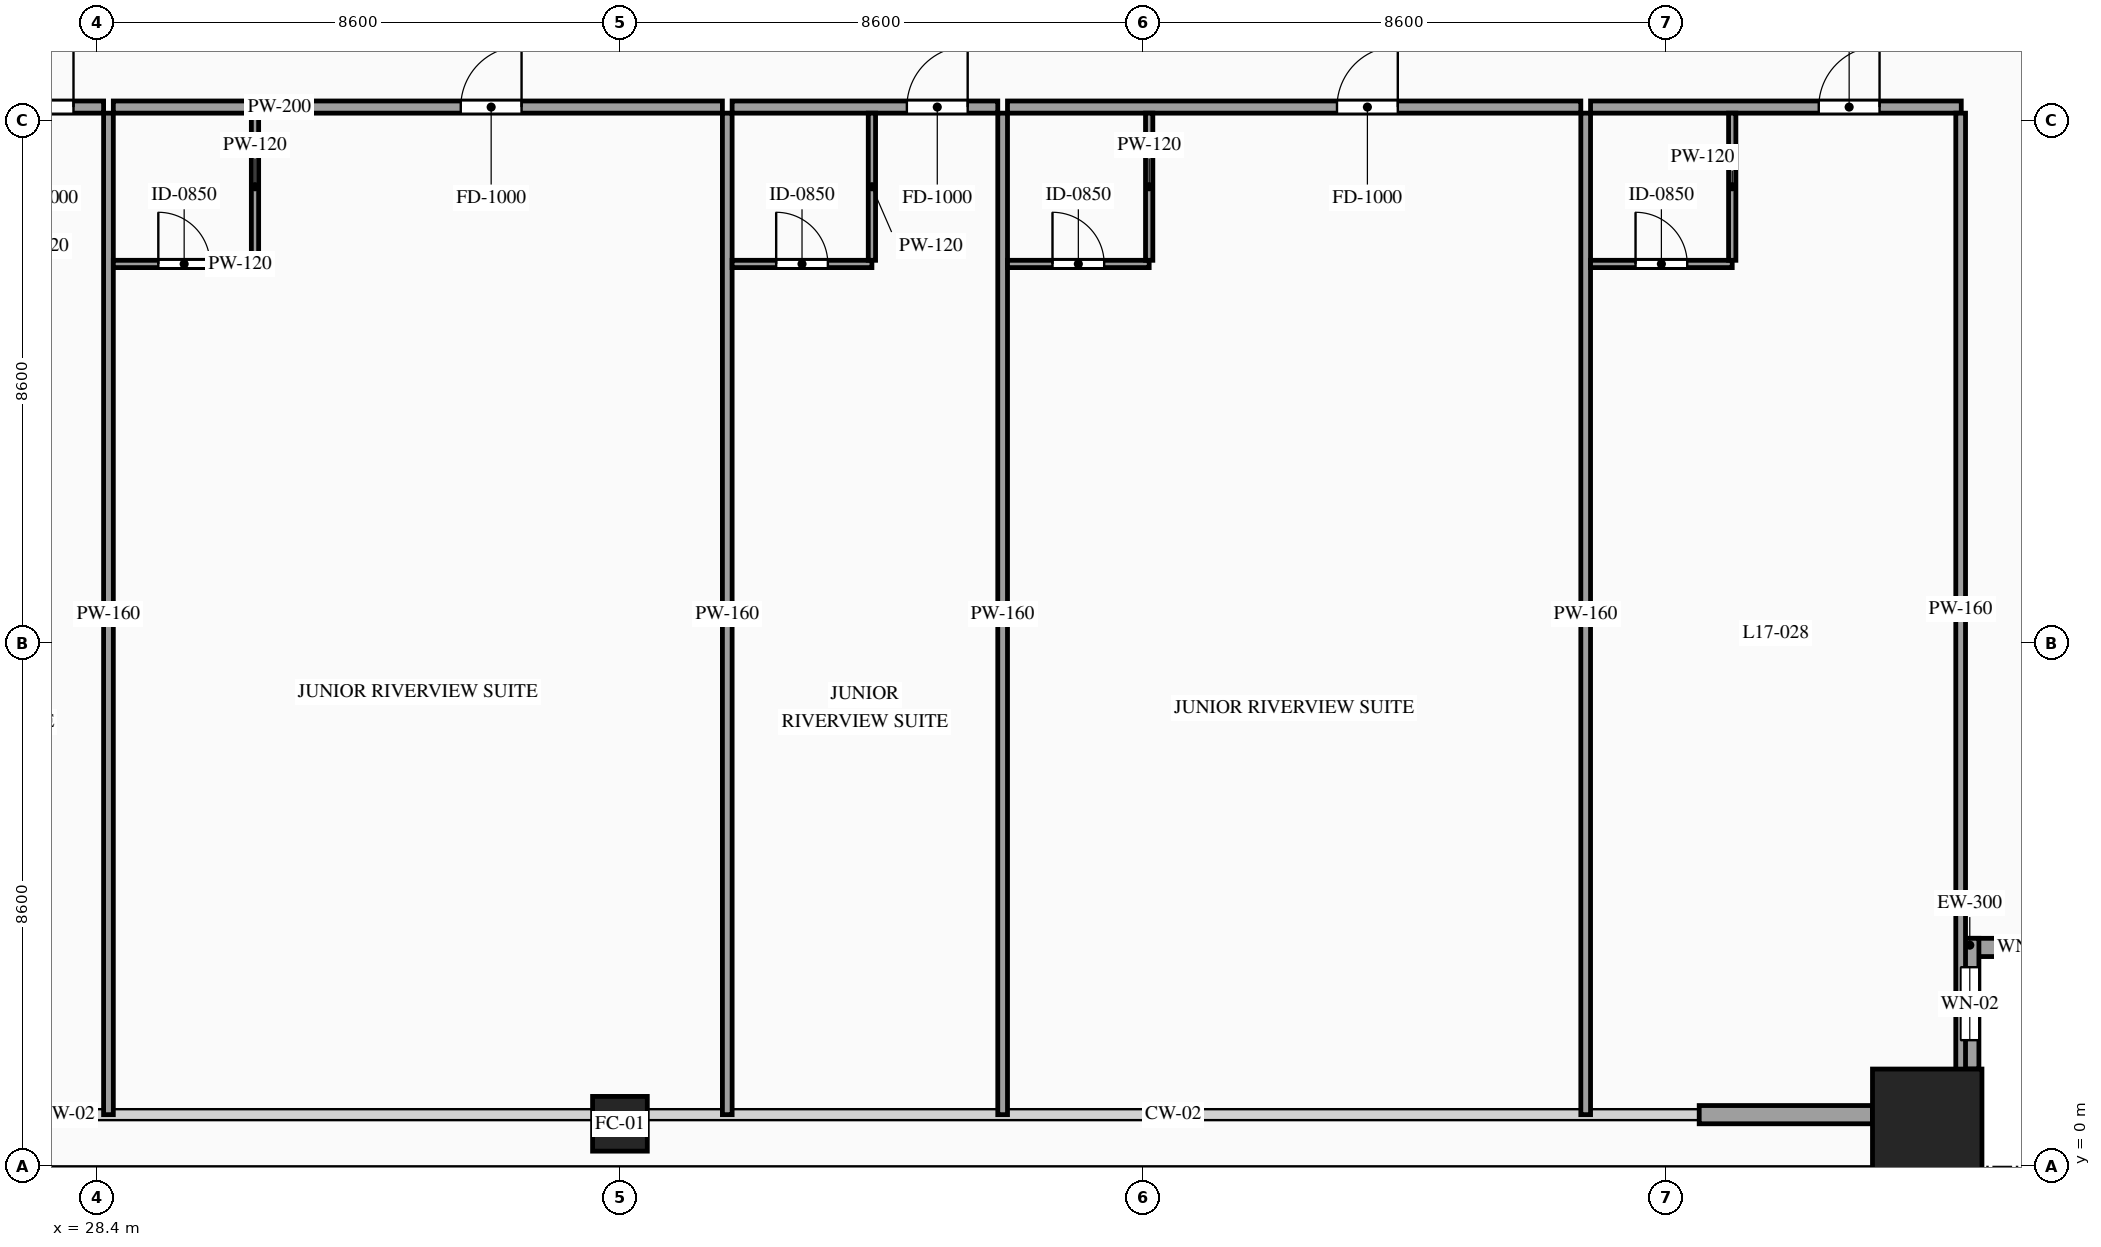
"""IFC4 building model, lengths in metres.
Left out: names, types, materials, properties, quantities, classifications, styles, units other than length and angle.
Written with IfcOpenShell. Run it as: python <this file> out.ifc"""

import sys

from ifc_helpers import new_model, si_unit, direction, frame, frame_2d, origin, origin_2d, place, context, subcontext, project, spatial, rectangle, hollow_rectangle, extrude, source, transform, mapped, element, fill, save


model = new_model("IFC4")
c1 = context("Model", 3, precision=1e-05, world=origin(), true_north=direction((0.0, 1.0)))
c2 = subcontext(c1, "Body", "Model", "MODEL_VIEW")
j1 = project(units=[si_unit("LENGTHUNIT", "METRE"), si_unit("PLANEANGLEUNIT", "RADIAN")], contexts=[c1])
p1 = place(None, origin())
s1 = spatial("IfcSite", under=j1, at=p1, CompositionType="ELEMENT")
p2 = place(p1, origin())
s2 = spatial("IfcBuilding", under=s1, at=p2, CompositionType="ELEMENT")
p3 = place(p2, frame((0.0, 0.0, 67.6)))
s3 = spatial("IfcBuildingStorey", under=s2, at=p3, CompositionType="ELEMENT", Elevation=67.6)
m1 = source(origin(), c2, "Body", "SweptSolid", [
    extrude(hollow_rectangle(XDim=0.9, YDim=0.9, WallThickness=0.042, at=origin_2d()), origin(), (0.0, 0.0, 1.0), 3.6),
])
p4 = place(p3, frame((37.0, 0.7, 0.0), z_axis=(0.0, 0.0, 1.0), x_axis=(1.0, 0.0, 0.0)))
e1 = element("IfcColumn", 1, at=p4, inside=s3, PredefinedType="COLUMN", context=c2, shape_type="MappedRepresentation", body=[
    mapped(m1, transform((0.0, 0.0, 0.0), scale=1.0)),
])
m2 = source(origin(), c2, "Body", "SweptSolid", [
    extrude(hollow_rectangle(XDim=1.8, YDim=1.8, WallThickness=0.08, at=origin_2d()), origin(), (0.0, 0.0, 1.0), 3.6),
])
p5 = place(p3, frame((58.5, 0.7, 0.0), z_axis=(0.0, 0.0, 1.0), x_axis=(1.0, 0.0, 0.0)))
e2 = element("IfcColumn", 2, at=p5, inside=s3, PredefinedType="COLUMN", context=c2, shape_type="MappedRepresentation", body=[
    mapped(m2, transform((0.0, 0.0, 0.0), scale=1.0)),
])
p6 = place(p3, frame((59.05, 3.6, 0.0), z_axis=(0.0, 0.0, 1.0), x_axis=(1.0, 0.0, 0.0)))
e3 = element("IfcWall", 3, at=p6, inside=s3, PredefinedType="SOLIDWALL", context=c2, shape_type="SweptSolid", body=[
    extrude(rectangle(XDim=2.15, YDim=0.3, at=frame_2d((1.075, 0.0))), origin(), (0.0, 0.0, 1.0), 3.38),
])
p7 = place(p6, frame((0.625, 0.0, 0.85)))
e4 = element("IfcOpeningElement", 4, at=p7, cuts=e3, PredefinedType="OPENING", context=c2, shape_type="SweptSolid", body=[
    extrude(rectangle(XDim=0.9, YDim=1.5, at=frame_2d((0.45, 0.75))), frame((0.0, 0.165, 0.0), z_axis=(0.0, -1.0, 0.0), x_axis=(1.0, 0.0, 0.0)), (0.0, 0.0, 1.0), 0.33),
])
p8 = place(p3, frame((59.2, 1.6, 0.0), z_axis=(0.0, 0.0, 1.0), x_axis=(0.0, 1.0, 0.0)))
e5 = element("IfcWall", 5, at=p8, inside=s3, PredefinedType="SOLIDWALL", context=c2, shape_type="SweptSolid", body=[
    extrude(rectangle(XDim=2.15, YDim=0.3, at=frame_2d((1.075, 0.0))), origin(), (0.0, 0.0, 1.0), 3.38),
])
p9 = place(p8, frame((0.475, 0.0, 0.85)))
e6 = element("IfcOpeningElement", 6, at=p9, cuts=e5, PredefinedType="OPENING", context=c2, shape_type="SweptSolid", body=[
    extrude(rectangle(XDim=1.2, YDim=2.1, at=frame_2d((0.6, 1.05))), frame((0.0, 0.165, 0.0), z_axis=(0.0, -1.0, 0.0), x_axis=(1.0, 0.0, 0.0)), (0.0, 0.0, 1.0), 0.33),
])
m3 = source(origin(), c2, "Body", "SweptSolid", [
    extrude(rectangle(XDim=2.85, YDim=0.3, at=frame_2d((1.425, 0.0))), origin(), (0.0, 0.0, 1.0), 2.775),
])
p10 = place(p3, frame((54.75, 0.85, 0.0), z_axis=(0.0, 0.0, 1.0), x_axis=(1.0, 0.0, 0.0)))
e7 = element("IfcWall", 7, at=p10, inside=s3, PredefinedType="SOLIDWALL", context=c2, shape_type="MappedRepresentation", body=[
    mapped(m3, transform((0.0, 0.0, 0.0), scale=1.0)),
])
p11 = place(p3, frame((24.138, 17.42, 0.0), z_axis=(0.0, 0.0, 1.0), x_axis=(1.0, 0.0, 0.0)))
e8 = element("IfcWall", 8, at=p11, inside=s3, PredefinedType="PARTITIONING", context=c2, shape_type="SweptSolid", body=[
    extrude(rectangle(XDim=4.37, YDim=0.2, at=frame_2d((2.185, 0.0))), origin(), (0.0, 0.0, 1.0), 3.38),
])
p12 = place(p11, frame((2.875, 0.0, 0.0)))
e9 = element("IfcOpeningElement", 9, at=p12, cuts=e8, PredefinedType="OPENING", context=c2, shape_type="SweptSolid", body=[
    extrude(rectangle(XDim=1.0, YDim=2.2, at=frame_2d((0.5, 1.1))), frame((0.0, 0.115, 0.0), z_axis=(0.0, -1.0, 0.0), x_axis=(1.0, 0.0, 0.0)), (0.0, 0.0, 1.0), 0.23),
])
m4 = source(origin(), c2, "Body", "SweptSolid", [
    extrude(rectangle(XDim=16.47, YDim=0.16, at=frame_2d((8.235, 0.0))), origin(), (0.0, 0.0, 1.0), 3.38),
])
p13 = place(p3, frame((28.588, 0.85, 0.0), z_axis=(0.0, 0.0, 1.0), x_axis=(0.0, 1.0, 0.0)))
e10 = element("IfcWall", 10, at=p13, inside=s3, PredefinedType="PARTITIONING", context=c2, shape_type="MappedRepresentation", body=[
    mapped(m4, transform((0.0, 0.0, 0.0), scale=1.0)),
])
p14 = place(p3, frame((28.668, 17.42, 0.0), z_axis=(0.0, 0.0, 1.0), x_axis=(1.0, 0.0, 0.0)))
e11 = element("IfcWall", 11, at=p14, inside=s3, PredefinedType="PARTITIONING", context=c2, shape_type="SweptSolid", body=[
    extrude(rectangle(XDim=10.017, YDim=0.2, at=frame_2d((5.009, 0.0))), origin(), (0.0, 0.0, 1.0), 3.38),
])
p15 = place(p14, frame((5.714, 0.0, 0.0)))
e12 = element("IfcOpeningElement", 12, at=p15, cuts=e11, PredefinedType="OPENING", context=c2, shape_type="SweptSolid", body=[
    extrude(rectangle(XDim=1.0, YDim=2.2, at=frame_2d((0.5, 1.1))), frame((0.0, 0.115, 0.0), z_axis=(0.0, -1.0, 0.0), x_axis=(1.0, 0.0, 0.0)), (0.0, 0.0, 1.0), 0.23),
])
p16 = place(p3, frame((38.765, 0.85, 0.0), z_axis=(0.0, 0.0, 1.0), x_axis=(0.0, 1.0, 0.0)))
e13 = element("IfcWall", 13, at=p16, inside=s3, PredefinedType="PARTITIONING", context=c2, shape_type="MappedRepresentation", body=[
    mapped(m4, transform((0.0, 0.0, 0.0), scale=1.0)),
])
p17 = place(p3, frame((28.668, 14.84, 0.0), z_axis=(0.0, 0.0, 1.0), x_axis=(1.0, 0.0, 0.0)))
e14 = element("IfcWall", 14, at=p17, inside=s3, PredefinedType="PARTITIONING", context=c2, shape_type="SweptSolid", body=[
    extrude(rectangle(XDim=2.33, YDim=0.12, at=frame_2d((1.165, 0.0))), origin(), (0.0, 0.0, 1.0), 3.38),
])
p18 = place(p17, frame((0.74, 0.0, 0.0)))
e15 = element("IfcOpeningElement", 15, at=p18, cuts=e14, PredefinedType="OPENING", context=c2, shape_type="SweptSolid", body=[
    extrude(rectangle(XDim=0.85, YDim=2.1, at=frame_2d((0.425, 1.05))), frame((0.0, 0.075, 0.0), z_axis=(0.0, -1.0, 0.0), x_axis=(1.0, 0.0, 0.0)), (0.0, 0.0, 1.0), 0.15),
])
m5 = source(origin(), c2, "Body", "SweptSolid", [
    extrude(rectangle(XDim=2.42, YDim=0.12, at=frame_2d((1.21, 0.0))), origin(), (0.0, 0.0, 1.0), 3.38),
])
p19 = place(p3, frame((30.998, 14.9, 0.0), z_axis=(0.0, 0.0, 1.0), x_axis=(0.0, 1.0, 0.0)))
e16 = element("IfcWall", 16, at=p19, inside=s3, PredefinedType="PARTITIONING", context=c2, shape_type="MappedRepresentation", body=[
    mapped(m5, transform((0.0, 0.0, 0.0), scale=1.0)),
])
p20 = place(p3, frame((38.845, 17.42, 0.0), z_axis=(0.0, 0.0, 1.0), x_axis=(1.0, 0.0, 0.0)))
e17 = element("IfcWall", 17, at=p20, inside=s3, PredefinedType="PARTITIONING", context=c2, shape_type="SweptSolid", body=[
    extrude(rectangle(XDim=4.369, YDim=0.2, at=frame_2d((2.185, 0.0))), origin(), (0.0, 0.0, 1.0), 3.38),
])
p21 = place(p20, frame((2.874, 0.0, 0.0)))
e18 = element("IfcOpeningElement", 18, at=p21, cuts=e17, PredefinedType="OPENING", context=c2, shape_type="SweptSolid", body=[
    extrude(rectangle(XDim=1.0, YDim=2.2, at=frame_2d((0.5, 1.1))), frame((0.0, 0.115, 0.0), z_axis=(0.0, -1.0, 0.0), x_axis=(1.0, 0.0, 0.0)), (0.0, 0.0, 1.0), 0.23),
])
p22 = place(p3, frame((43.294, 0.85, 0.0), z_axis=(0.0, 0.0, 1.0), x_axis=(0.0, 1.0, 0.0)))
e19 = element("IfcWall", 19, at=p22, inside=s3, PredefinedType="PARTITIONING", context=c2, shape_type="MappedRepresentation", body=[
    mapped(m4, transform((0.0, 0.0, 0.0), scale=1.0)),
])
p23 = place(p3, frame((38.845, 14.84, 0.0), z_axis=(0.0, 0.0, 1.0), x_axis=(1.0, 0.0, 0.0)))
e20 = element("IfcWall", 20, at=p23, inside=s3, PredefinedType="PARTITIONING", context=c2, shape_type="SweptSolid", body=[
    extrude(rectangle(XDim=2.299, YDim=0.12, at=frame_2d((1.149, 0.0))), origin(), (0.0, 0.0, 1.0), 3.38),
])
p24 = place(p23, frame((0.725, 0.0, 0.0)))
e21 = element("IfcOpeningElement", 21, at=p24, cuts=e20, PredefinedType="OPENING", context=c2, shape_type="SweptSolid", body=[
    extrude(rectangle(XDim=0.85, YDim=2.1, at=frame_2d((0.425, 1.05))), frame((0.0, 0.075, 0.0), z_axis=(0.0, -1.0, 0.0), x_axis=(1.0, 0.0, 0.0)), (0.0, 0.0, 1.0), 0.15),
])
p25 = place(p3, frame((41.144, 14.9, 0.0), z_axis=(0.0, 0.0, 1.0), x_axis=(0.0, 1.0, 0.0)))
e22 = element("IfcWall", 22, at=p25, inside=s3, PredefinedType="PARTITIONING", context=c2, shape_type="MappedRepresentation", body=[
    mapped(m5, transform((0.0, 0.0, 0.0), scale=1.0)),
])
p26 = place(p3, frame((43.374, 17.42, 0.0), z_axis=(0.0, 0.0, 1.0), x_axis=(1.0, 0.0, 0.0)))
e23 = element("IfcWall", 23, at=p26, inside=s3, PredefinedType="PARTITIONING", context=c2, shape_type="SweptSolid", body=[
    extrude(rectangle(XDim=9.429, YDim=0.2, at=frame_2d((4.714, 0.0))), origin(), (0.0, 0.0, 1.0), 3.38),
])
p27 = place(p26, frame((5.419, 0.0, 0.0)))
e24 = element("IfcOpeningElement", 24, at=p27, cuts=e23, PredefinedType="OPENING", context=c2, shape_type="SweptSolid", body=[
    extrude(rectangle(XDim=1.0, YDim=2.2, at=frame_2d((0.5, 1.1))), frame((0.0, 0.115, 0.0), z_axis=(0.0, -1.0, 0.0), x_axis=(1.0, 0.0, 0.0)), (0.0, 0.0, 1.0), 0.23),
])
p28 = place(p3, frame((52.883, 0.85, 0.0), z_axis=(0.0, 0.0, 1.0), x_axis=(0.0, 1.0, 0.0)))
e25 = element("IfcWall", 25, at=p28, inside=s3, PredefinedType="PARTITIONING", context=c2, shape_type="MappedRepresentation", body=[
    mapped(m4, transform((0.0, 0.0, 0.0), scale=1.0)),
])
p29 = place(p3, frame((43.374, 14.84, 0.0), z_axis=(0.0, 0.0, 1.0), x_axis=(1.0, 0.0, 0.0)))
e26 = element("IfcWall", 26, at=p29, inside=s3, PredefinedType="PARTITIONING", context=c2, shape_type="SweptSolid", body=[
    extrude(rectangle(XDim=2.33, YDim=0.12, at=frame_2d((1.165, 0.0))), origin(), (0.0, 0.0, 1.0), 3.38),
])
p30 = place(p29, frame((0.74, 0.0, 0.0)))
e27 = element("IfcOpeningElement", 27, at=p30, cuts=e26, PredefinedType="OPENING", context=c2, shape_type="SweptSolid", body=[
    extrude(rectangle(XDim=0.85, YDim=2.1, at=frame_2d((0.425, 1.05))), frame((0.0, 0.075, 0.0), z_axis=(0.0, -1.0, 0.0), x_axis=(1.0, 0.0, 0.0)), (0.0, 0.0, 1.0), 0.15),
])
p31 = place(p3, frame((45.704, 14.9, 0.0), z_axis=(0.0, 0.0, 1.0), x_axis=(0.0, 1.0, 0.0)))
e28 = element("IfcWall", 28, at=p31, inside=s3, PredefinedType="PARTITIONING", context=c2, shape_type="MappedRepresentation", body=[
    mapped(m5, transform((0.0, 0.0, 0.0), scale=1.0)),
])
p32 = place(p3, frame((52.963, 17.42, 0.0), z_axis=(0.0, 0.0, 1.0), x_axis=(1.0, 0.0, 0.0)))
e29 = element("IfcWall", 29, at=p32, inside=s3, PredefinedType="PARTITIONING", context=c2, shape_type="SweptSolid", body=[
    extrude(rectangle(XDim=6.097, YDim=0.2, at=frame_2d((3.049, 0.0))), origin(), (0.0, 0.0, 1.0), 3.38),
])
p33 = place(p32, frame((3.753, 0.0, 0.0)))
e30 = element("IfcOpeningElement", 30, at=p33, cuts=e29, PredefinedType="OPENING", context=c2, shape_type="SweptSolid", body=[
    extrude(rectangle(XDim=1.0, YDim=2.2, at=frame_2d((0.5, 1.1))), frame((0.0, 0.115, 0.0), z_axis=(0.0, -1.0, 0.0), x_axis=(1.0, 0.0, 0.0)), (0.0, 0.0, 1.0), 0.23),
])
m6 = source(origin(), c2, "Body", "SweptSolid", [
    extrude(rectangle(XDim=16.32, YDim=0.16, at=frame_2d((8.16, 0.0))), origin(), (0.0, 0.0, 1.0), 3.38),
])
p34 = place(p3, frame((59.05, 1.0, 0.0), z_axis=(0.0, 0.0, 1.0), x_axis=(0.0, 1.0, 0.0)))
e31 = element("IfcWall", 31, at=p34, inside=s3, PredefinedType="PARTITIONING", context=c2, shape_type="MappedRepresentation", body=[
    mapped(m6, transform((0.0, 0.0, 0.0), scale=1.0)),
])
p35 = place(p3, frame((52.963, 14.84, 0.0), z_axis=(0.0, 0.0, 1.0), x_axis=(1.0, 0.0, 0.0)))
e32 = element("IfcWall", 32, at=p35, inside=s3, PredefinedType="PARTITIONING", context=c2, shape_type="SweptSolid", body=[
    extrude(rectangle(XDim=2.33, YDim=0.12, at=frame_2d((1.165, 0.0))), origin(), (0.0, 0.0, 1.0), 3.38),
])
p36 = place(p35, frame((0.74, 0.0, 0.0)))
e33 = element("IfcOpeningElement", 33, at=p36, cuts=e32, PredefinedType="OPENING", context=c2, shape_type="SweptSolid", body=[
    extrude(rectangle(XDim=0.85, YDim=2.1, at=frame_2d((0.425, 1.05))), frame((0.0, 0.075, 0.0), z_axis=(0.0, -1.0, 0.0), x_axis=(1.0, 0.0, 0.0)), (0.0, 0.0, 1.0), 0.15),
])
p37 = place(p3, frame((55.293, 14.9, 0.0), z_axis=(0.0, 0.0, 1.0), x_axis=(0.0, 1.0, 0.0)))
e34 = element("IfcWall", 34, at=p37, inside=s3, PredefinedType="PARTITIONING", context=c2, shape_type="MappedRepresentation", body=[
    mapped(m5, transform((0.0, 0.0, 0.0), scale=1.0)),
])
m7 = source(origin(), c2, "Body", "SweptSolid", [
    extrude(rectangle(XDim=0.9, YDim=1.5, at=frame_2d((0.45, 0.75))), frame((0.0, 0.03, 0.0), z_axis=(0.0, -1.0, 0.0), x_axis=(1.0, 0.0, 0.0)), (0.0, 0.0, 1.0), 0.06),
])
p38 = place(p7, origin())
e35 = element("IfcWindow", 35, at=p38, inside=s3, PartitioningType="SINGLE_PANEL", PredefinedType="WINDOW", context=c2, shape_type="MappedRepresentation", body=[
    mapped(m7, transform((0.0, 0.0, 0.0), scale=1.0)),
])
fill(e4, e35)
m8 = source(origin(), c2, "Body", "SweptSolid", [
    extrude(rectangle(XDim=1.2, YDim=2.1, at=frame_2d((0.6, 1.05))), frame((0.0, 0.03, 0.0), z_axis=(0.0, -1.0, 0.0), x_axis=(1.0, 0.0, 0.0)), (0.0, 0.0, 1.0), 0.06),
])
p39 = place(p9, origin())
e36 = element("IfcWindow", 36, at=p39, inside=s3, PartitioningType="SINGLE_PANEL", PredefinedType="WINDOW", context=c2, shape_type="MappedRepresentation", body=[
    mapped(m8, transform((0.0, 0.0, 0.0), scale=1.0)),
])
fill(e6, e36)
m9 = source(origin(), c2, "Body", "SweptSolid", [
    extrude(rectangle(XDim=1.0, YDim=2.2, at=frame_2d((0.5, 1.1))), frame((0.0, 0.025, 0.0), z_axis=(0.0, -1.0, 0.0), x_axis=(1.0, 0.0, 0.0)), (0.0, 0.0, 1.0), 0.05),
])
p40 = place(p12, origin())
e37 = element("IfcDoor", 37, at=p40, inside=s3, OperationType="SINGLE_SWING_RIGHT", PredefinedType="DOOR", context=c2, shape_type="MappedRepresentation", body=[
    mapped(m9, transform((0.0, 0.0, 0.0), scale=1.0)),
])
fill(e9, e37)
p41 = place(p15, origin())
e38 = element("IfcDoor", 38, at=p41, inside=s3, OperationType="SINGLE_SWING_RIGHT", PredefinedType="DOOR", context=c2, shape_type="MappedRepresentation", body=[
    mapped(m9, transform((0.0, 0.0, 0.0), scale=1.0)),
])
fill(e12, e38)
m10 = source(origin(), c2, "Body", "SweptSolid", [
    extrude(rectangle(XDim=0.85, YDim=2.1, at=frame_2d((0.425, 1.05))), frame((0.0, 0.025, 0.0), z_axis=(0.0, -1.0, 0.0), x_axis=(1.0, 0.0, 0.0)), (0.0, 0.0, 1.0), 0.05),
])
p42 = place(p18, origin())
e39 = element("IfcDoor", 39, at=p42, inside=s3, OperationType="SINGLE_SWING_LEFT", PredefinedType="DOOR", context=c2, shape_type="MappedRepresentation", body=[
    mapped(m10, transform((0.0, 0.0, 0.0), scale=1.0)),
])
fill(e15, e39)
p43 = place(p21, origin())
e40 = element("IfcDoor", 40, at=p43, inside=s3, OperationType="SINGLE_SWING_RIGHT", PredefinedType="DOOR", context=c2, shape_type="MappedRepresentation", body=[
    mapped(m9, transform((0.0, 0.0, 0.0), scale=1.0)),
])
fill(e18, e40)
p44 = place(p24, origin())
e41 = element("IfcDoor", 41, at=p44, inside=s3, OperationType="SINGLE_SWING_LEFT", PredefinedType="DOOR", context=c2, shape_type="MappedRepresentation", body=[
    mapped(m10, transform((0.0, 0.0, 0.0), scale=1.0)),
])
fill(e21, e41)
p45 = place(p27, origin())
e42 = element("IfcDoor", 42, at=p45, inside=s3, OperationType="SINGLE_SWING_RIGHT", PredefinedType="DOOR", context=c2, shape_type="MappedRepresentation", body=[
    mapped(m9, transform((0.0, 0.0, 0.0), scale=1.0)),
])
fill(e24, e42)
p46 = place(p30, origin())
e43 = element("IfcDoor", 43, at=p46, inside=s3, OperationType="SINGLE_SWING_LEFT", PredefinedType="DOOR", context=c2, shape_type="MappedRepresentation", body=[
    mapped(m10, transform((0.0, 0.0, 0.0), scale=1.0)),
])
fill(e27, e43)
p47 = place(p33, origin())
e44 = element("IfcDoor", 44, at=p47, inside=s3, OperationType="SINGLE_SWING_RIGHT", PredefinedType="DOOR", context=c2, shape_type="MappedRepresentation", body=[
    mapped(m9, transform((0.0, 0.0, 0.0), scale=1.0)),
])
fill(e30, e44)
p48 = place(p36, origin())
e45 = element("IfcDoor", 45, at=p48, inside=s3, OperationType="SINGLE_SWING_LEFT", PredefinedType="DOOR", context=c2, shape_type="MappedRepresentation", body=[
    mapped(m10, transform((0.0, 0.0, 0.0), scale=1.0)),
])
fill(e33, e45)
save(model, sys.argv[1])
